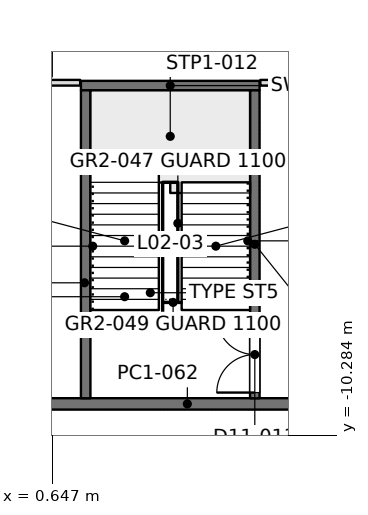
"""IFC4 building model, lengths in metres.
Left out: names, types, materials, properties, quantities, classifications, styles, units other than length and angle.
Written with IfcOpenShell. Run it as: python <this file> out.ifc"""

import sys

from ifc_helpers import new_model, si_unit, direction, frame, frame_2d, origin, place, context, subcontext, project, spatial, rectangle, extrude, element, fill, save


model = new_model("IFC4")
c1 = context("Model", 3, precision=1e-05, world=origin(), true_north=direction((0.0, 1.0)))
c2 = subcontext(c1, "Body", "Model", "MODEL_VIEW")
j1 = project(units=[si_unit("LENGTHUNIT", "METRE"), si_unit("PLANEANGLEUNIT", "RADIAN")], contexts=[c1])
p1 = place(None, origin())
s1 = spatial("IfcSite", under=j1, at=p1, CompositionType="ELEMENT")
p2 = place(p1, origin())
s2 = spatial("IfcBuilding", under=s1, at=p2, CompositionType="ELEMENT")
p3 = place(p2, frame((0.0, 0.0, 9.9)))
s3 = spatial("IfcBuildingStorey", under=s2, at=p3, CompositionType="ELEMENT", Elevation=9.9)
p4 = place(p3, frame((8.4, -9.45, 0.0), z_axis=(0.0, 0.0, 1.0), x_axis=(-1.0, 0.0, 0.0)))
e1 = element("IfcWall", 1, at=p4, inside=s3, PredefinedType="SOLIDWALL", context=c2, shape_type="SweptSolid", body=[
    extrude(rectangle(XDim=8.4, YDim=0.3, at=frame_2d((4.2, 0.0))), origin(), (0.0, 0.0, 1.0), 4.3),
])
p5 = place(p3, frame((-2.8, -1.0, 0.0), z_axis=(0.0, 0.0, 1.0), x_axis=(1.0, 0.0, 0.0)))
e2 = element("IfcWall", 2, at=p5, inside=s3, PredefinedType="PARTITIONING", context=c2, shape_type="SweptSolid", body=[
    extrude(rectangle(XDim=4.18, YDim=0.15, at=frame_2d((2.09, 0.0))), origin(), (0.0, 0.0, 1.0), 3.65),
])
p6 = place(p3, frame((6.12, -1.0, 0.0), z_axis=(0.0, 0.0, 1.0), x_axis=(1.0, 0.0, 0.0)))
e3 = element("IfcWall", 3, at=p6, inside=s3, PredefinedType="PARTITIONING", context=c2, shape_type="SweptSolid", body=[
    extrude(rectangle(XDim=38.16, YDim=0.15, at=frame_2d((19.08, 0.0))), origin(), (0.0, 0.0, 1.0), 3.65),
])
p7 = place(p6, frame((13.98, 0.0, 0.0)))
e4 = element("IfcOpeningElement", 4, at=p7, cuts=e3, PredefinedType="OPENING", context=c2, shape_type="SweptSolid", body=[
    extrude(rectangle(XDim=1.8, YDim=2.2, at=frame_2d((0.9, 1.1))), frame((0.0, 0.085, 0.0), z_axis=(0.0, -1.0, 0.0), x_axis=(1.0, 0.0, 0.0)), (0.0, 0.0, 1.0), 0.17),
])
p8 = place(p6, frame((22.38, 0.0, 0.0)))
e5 = element("IfcOpeningElement", 5, at=p8, cuts=e3, PredefinedType="OPENING", context=c2, shape_type="SweptSolid", body=[
    extrude(rectangle(XDim=1.8, YDim=2.2, at=frame_2d((0.9, 1.1))), frame((0.0, 0.085, 0.0), z_axis=(0.0, -1.0, 0.0), x_axis=(1.0, 0.0, 0.0)), (0.0, 0.0, 1.0), 0.17),
])
p9 = place(p3, frame((1.525, -9.302, 0.0), z_axis=(0.0, 0.0, 1.0), x_axis=(0.0, 1.0, 0.0)))
e6 = element("IfcWall", 6, at=p9, inside=s3, PredefinedType="SOLIDWALL", context=c2, shape_type="SweptSolid", body=[
    extrude(rectangle(XDim=8.102, YDim=0.25, at=frame_2d((4.051, 0.0))), origin(), (0.0, 0.0, 1.0), 4.5),
])
p10 = place(p3, frame((5.975, -9.302, 0.0), z_axis=(0.0, 0.0, 1.0), x_axis=(0.0, 1.0, 0.0)))
e7 = element("IfcWall", 7, at=p10, inside=s3, PredefinedType="SOLIDWALL", context=c2, shape_type="SweptSolid", body=[
    extrude(rectangle(XDim=8.102, YDim=0.25, at=frame_2d((4.051, 0.0))), origin(), (0.0, 0.0, 1.0), 4.5),
])
p11 = place(p10, frame((0.15, 0.0, 0.0)))
e8 = element("IfcOpeningElement", 8, at=p11, cuts=e7, PredefinedType="OPENING", context=c2, shape_type="SweptSolid", body=[
    extrude(rectangle(XDim=2.0, YDim=2.2, at=frame_2d((1.0, 1.1))), frame((0.0, 0.135, 0.0), z_axis=(0.0, -1.0, 0.0), x_axis=(1.0, 0.0, 0.0)), (0.0, 0.0, 1.0), 0.27),
])
p12 = place(p3, frame((1.4, -1.075, 0.0), z_axis=(0.0, 0.0, 1.0), x_axis=(1.0, 0.0, 0.0)))
e9 = element("IfcWall", 9, at=p12, inside=s3, PredefinedType="SOLIDWALL", context=c2, shape_type="SweptSolid", body=[
    extrude(rectangle(XDim=4.7, YDim=0.25, at=frame_2d((2.35, 0.0))), origin(), (0.0, 0.0, 1.0), 4.5),
])
p13 = place(p11, origin())
e10 = element("IfcDoor", 10, at=p13, inside=s3, OperationType="DOUBLE_DOOR_SINGLE_SWING", PredefinedType="DOOR", context=c2, shape_type="SweptSolid", body=[
    extrude(rectangle(XDim=2.0, YDim=2.2, at=frame_2d((1.0, 1.1))), frame((0.0, 0.025, 0.0), z_axis=(0.0, -1.0, 0.0), x_axis=(1.0, 0.0, 0.0)), (0.0, 0.0, 1.0), 0.05),
])
fill(e8, e10)
save(model, sys.argv[1])
